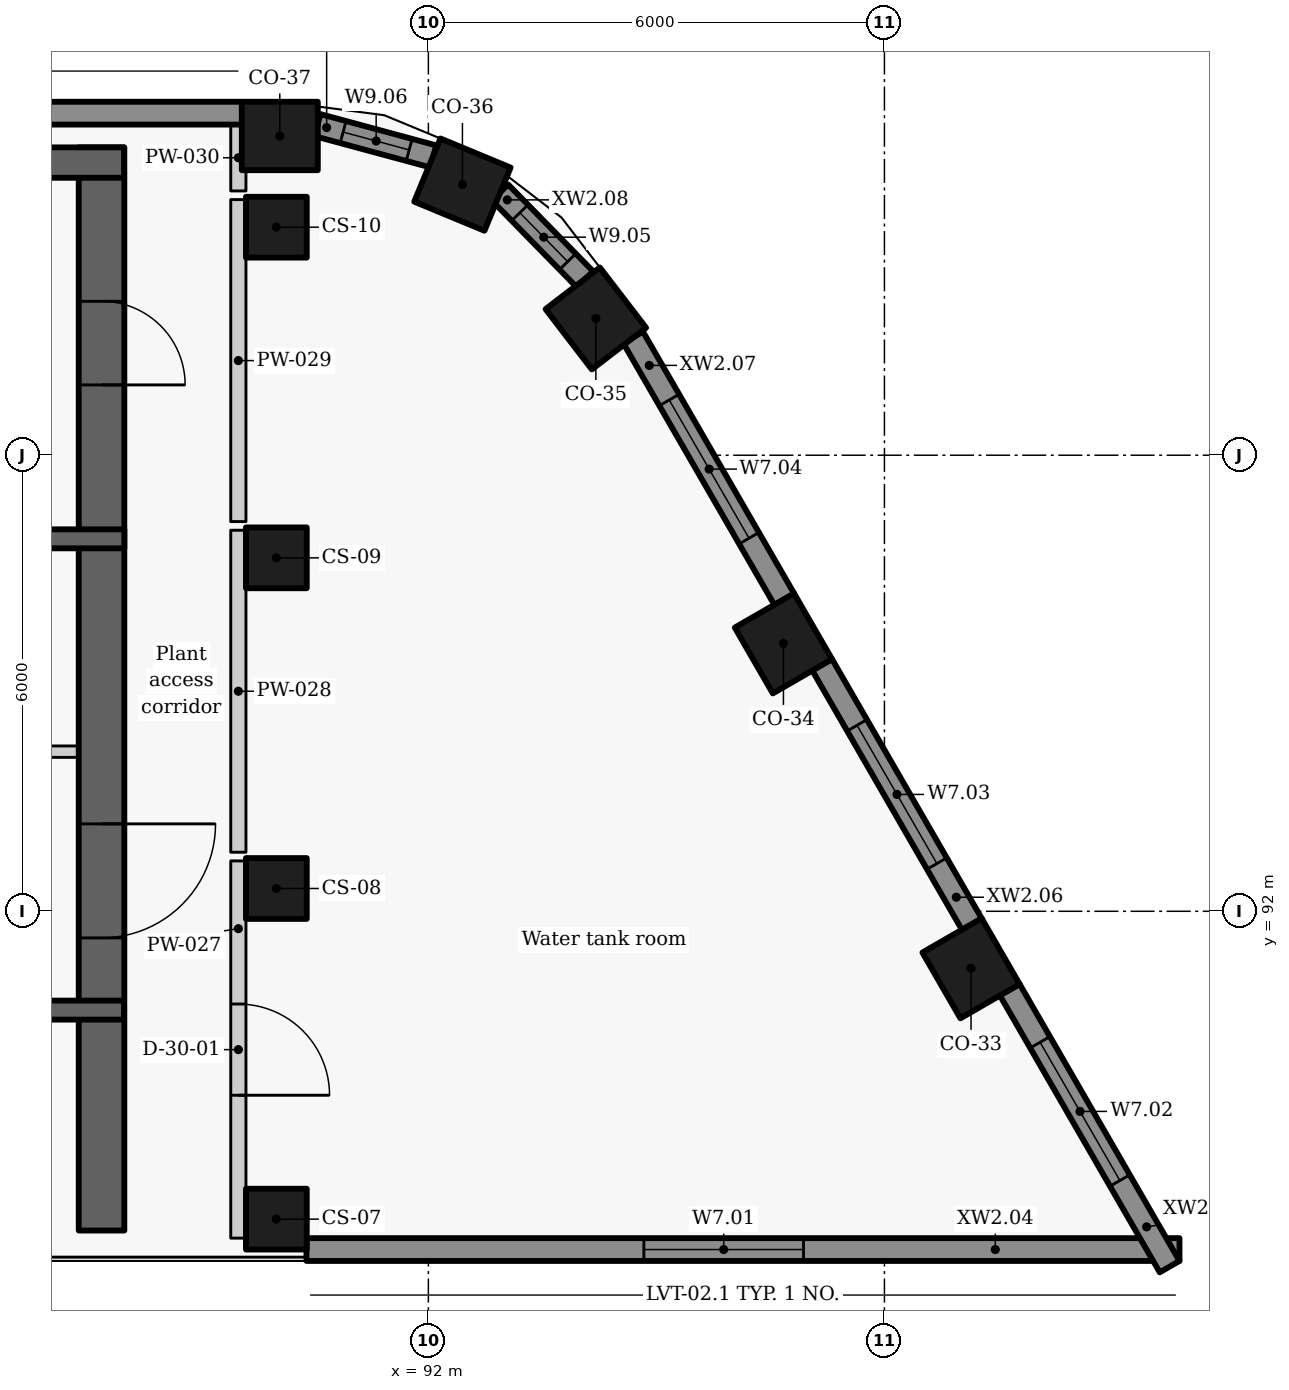
"""IFC4 building model, lengths in metres.
Left out: names, types, materials, properties, quantities, classifications, styles, units other than length and angle.
Written with IfcOpenShell. Run it as: python <this file> out.ifc"""

import sys

from ifc_helpers import new_model, si_unit, direction, frame, frame_2d, origin, origin_2d, place, context, subcontext, project, spatial, rectangle, extrude, element, fill, save


model = new_model("IFC4")
c1 = context("Model", 3, precision=1e-05, world=origin(), true_north=direction((0.0, 1.0)))
c2 = subcontext(c1, "Body", "Model", "MODEL_VIEW")
j1 = project(units=[si_unit("LENGTHUNIT", "METRE"), si_unit("PLANEANGLEUNIT", "RADIAN")], contexts=[c1])
p1 = place(None, origin())
s1 = spatial("IfcSite", under=j1, at=p1, CompositionType="ELEMENT")
p2 = place(p1, origin())
s2 = spatial("IfcBuilding", under=s1, at=p2, CompositionType="ELEMENT")
p3 = place(p2, frame((0.0, 0.0, 294.0)))
s3 = spatial("IfcBuildingStorey", under=s2, at=p3, CompositionType="ELEMENT", Elevation=294.0)
for number, where, z_axis, x_axis in (
    (1, (99.139, 91.25, 0.0), (0.0, 0.0, 1.0), (-0.5, 0.866, 0.0)),
    (2, (96.671, 95.525, 0.0), (0.0, 0.0, 1.0), (-0.5, 0.866, 0.0)),
    (3, (94.203, 99.8, 0.0), (0.0, 0.0, 1.0), (-0.609, 0.793, 0.0)),
    (4, (92.448, 101.56, 0.0), (0.0, 0.0, 1.0), (-0.924, 0.383, 0.0)),
    (5, (90.045, 102.2, 0.0), (0.0, 0.0, 1.0), (-1.0, 0.0, 0.0)),
):
    element("IfcColumn", number, at=place(p3, frame(where, z_axis=z_axis, x_axis=x_axis)), inside=s3, PredefinedType="COLUMN", context=c2, shape_type="SweptSolid", body=[
        extrude(rectangle(XDim=1.0, YDim=0.9, at=origin_2d()), origin(), (0.0, 0.0, 1.0), 3.6),
    ])
for number, where, z_axis, x_axis in (
    (6, (90.0, 87.95, 0.0), (0.0, 0.0, 1.0), (0.0, 1.0, 0.0)),
    (7, (90.0, 92.3, 0.0), (0.0, 0.0, 1.0), (0.0, 1.0, 0.0)),
    (8, (90.0, 96.65, 0.0), (0.0, 0.0, 1.0), (0.0, 1.0, 0.0)),
    (9, (90.0, 101.0, 0.0), (0.0, 0.0, 1.0), (0.0, 1.0, 0.0)),
):
    element("IfcColumn", number, at=place(p3, frame(where, z_axis=z_axis, x_axis=x_axis)), inside=s3, PredefinedType="COLUMN", context=c2, shape_type="SweptSolid", body=[
        extrude(rectangle(XDim=0.8, YDim=0.8, at=origin_2d()), origin(), (0.0, 0.0, 1.0), 3.6),
    ])
p4 = place(p3, frame((90.396, 87.55, 0.0), z_axis=(0.0, 0.0, 1.0), x_axis=(1.0, 0.0, 0.0)))
e10 = element("IfcWall", 10, at=p4, inside=s3, PredefinedType="SOLIDWALL", context=c2, shape_type="SweptSolid", body=[
    extrude(rectangle(XDim=11.486, YDim=0.3, at=frame_2d((5.743, 0.0))), origin(), (0.0, 0.0, 1.0), 3.325),
])
p5 = place(p4, frame((4.439, 0.0, 0.9)))
e11 = element("IfcOpeningElement", 11, at=p5, cuts=e10, PredefinedType="OPENING", context=c2, shape_type="SweptSolid", body=[
    extrude(rectangle(XDim=2.1, YDim=1.1, at=frame_2d((1.05, 0.55))), frame((0.0, 0.16, 0.0), z_axis=(0.0, -1.0, 0.0), x_axis=(1.0, 0.0, 0.0)), (0.0, 0.0, 1.0), 0.32),
])
p6 = place(p3, frame((101.752, 87.325, 0.0), z_axis=(0.0, 0.0, 1.0), x_axis=(-0.499981865284, 0.866035873614, 0.0)))
e12 = element("IfcWall", 12, at=p6, inside=s3, PredefinedType="SOLIDWALL", context=c2, shape_type="SweptSolid", body=[
    extrude(rectangle(XDim=4.209, YDim=0.3, at=frame_2d((2.104, 0.0))), origin(), (0.0, 0.0, 1.0), 3.325),
])
p7 = place(p6, frame((1.308, 0.0, 0.9)))
e13 = element("IfcOpeningElement", 13, at=p7, cuts=e12, PredefinedType="OPENING", context=c2, shape_type="SweptSolid", body=[
    extrude(rectangle(XDim=2.1, YDim=1.1, at=frame_2d((1.05, 0.55))), frame((0.0, 0.16, 0.0), z_axis=(0.0, -1.0, 0.0), x_axis=(1.0, 0.0, 0.0)), (0.0, 0.0, 1.0), 0.32),
])
p8 = place(p3, frame((99.151, 91.829, 0.0), z_axis=(0.0, 0.0, 1.0), x_axis=(-0.499986771468, 0.866033041146, 0.0)))
e14 = element("IfcWall", 14, at=p8, inside=s3, PredefinedType="SOLIDWALL", context=c2, shape_type="SweptSolid", body=[
    extrude(rectangle(XDim=3.944, YDim=0.3, at=frame_2d((1.972, 0.0))), origin(), (0.0, 0.0, 1.0), 3.325),
])
p9 = place(p8, frame((0.922, 0.0, 0.9)))
e15 = element("IfcOpeningElement", 15, at=p9, cuts=e14, PredefinedType="OPENING", context=c2, shape_type="SweptSolid", body=[
    extrude(rectangle(XDim=2.1, YDim=1.1, at=frame_2d((1.05, 0.55))), frame((0.0, 0.16, 0.0), z_axis=(0.0, -1.0, 0.0), x_axis=(1.0, 0.0, 0.0)), (0.0, 0.0, 1.0), 0.32),
])
p10 = place(p3, frame((96.683, 96.104, 0.0), z_axis=(0.0, 0.0, 1.0), x_axis=(-0.500005687176, 0.866022120267, 0.0)))
e16 = element("IfcWall", 16, at=p10, inside=s3, PredefinedType="SOLIDWALL", context=c2, shape_type="SweptSolid", body=[
    extrude(rectangle(XDim=3.979, YDim=0.3, at=frame_2d((1.99, 0.0))), origin(), (0.0, 0.0, 1.0), 3.325),
])
p11 = place(p10, frame((0.928, 0.0, 0.9)))
e17 = element("IfcOpeningElement", 17, at=p11, cuts=e16, PredefinedType="OPENING", context=c2, shape_type="SweptSolid", body=[
    extrude(rectangle(XDim=2.1, YDim=1.1, at=frame_2d((1.05, 0.55))), frame((0.0, 0.16, 0.0), z_axis=(0.0, -1.0, 0.0), x_axis=(1.0, 0.0, 0.0)), (0.0, 0.0, 1.0), 0.32),
])
p12 = place(p3, frame((94.06, 100.315, 0.0), z_axis=(0.0, 0.0, 1.0), x_axis=(-0.6992720923, 0.714855608449, 0.0)))
e18 = element("IfcWall", 18, at=p12, inside=s3, PredefinedType="SOLIDWALL", context=c2, shape_type="SweptSolid", body=[
    extrude(rectangle(XDim=1.598, YDim=0.3, at=frame_2d((0.799, 0.0))), origin(), (0.0, 0.0, 1.0), 3.325),
])
p13 = place(p12, frame((0.325, 0.0, 0.9)))
e19 = element("IfcOpeningElement", 19, at=p13, cuts=e18, PredefinedType="OPENING", context=c2, shape_type="SweptSolid", body=[
    extrude(rectangle(XDim=0.9, YDim=1.1, at=frame_2d((0.45, 0.55))), frame((0.0, 0.16, 0.0), z_axis=(0.0, -1.0, 0.0), x_axis=(1.0, 0.0, 0.0)), (0.0, 0.0, 1.0), 0.32),
])
p14 = place(p3, frame((92.065, 101.931, 0.0), z_axis=(0.0, 0.0, 1.0), x_axis=(-0.965371819036, 0.260877846914, 0.0)))
e20 = element("IfcWall", 20, at=p14, inside=s3, PredefinedType="SOLIDWALL", context=c2, shape_type="SweptSolid", body=[
    extrude(rectangle(XDim=1.578, YDim=0.3, at=frame_2d((0.789, 0.0))), origin(), (0.0, 0.0, 1.0), 3.325),
])
p15 = place(p14, frame((0.329, 0.0, 0.9)))
e21 = element("IfcOpeningElement", 21, at=p15, cuts=e20, PredefinedType="OPENING", context=c2, shape_type="SweptSolid", body=[
    extrude(rectangle(XDim=0.9, YDim=1.1, at=frame_2d((0.45, 0.55))), frame((0.0, 0.16, 0.0), z_axis=(0.0, -1.0, 0.0), x_axis=(1.0, 0.0, 0.0)), (0.0, 0.0, 1.0), 0.32),
])
p16 = place(p3, frame((89.549, 102.5, 0.0), z_axis=(0.0, 0.0, 1.0), x_axis=(-1.0, 0.0, 0.0)))
e22 = element("IfcWall", 22, at=p16, inside=s3, PredefinedType="SOLIDWALL", context=c2, shape_type="SweptSolid", body=[
    extrude(rectangle(XDim=19.134, YDim=0.3, at=frame_2d((9.567, 0.0))), origin(), (0.0, 0.0, 1.0), 3.325),
])
p17 = place(p3, frame((85.397, 94.1, 0.0), z_axis=(0.0, 0.0, 1.0), x_axis=(1.0, 0.0, 0.0)))
e23 = element("IfcWall", 23, at=p17, inside=s3, PredefinedType="PARTITIONING", context=c2, shape_type="SweptSolid", body=[
    extrude(rectangle(XDim=2.603, YDim=0.15, at=frame_2d((1.302, 0.0))), origin(), (0.0, 0.0, 1.0), 3.325),
])
p18 = place(p17, frame((0.528, 0.0, 0.0)))
e24 = element("IfcOpeningElement", 24, at=p18, cuts=e23, PredefinedType="OPENING", context=c2, shape_type="SweptSolid", body=[
    extrude(rectangle(XDim=0.9, YDim=2.1, at=frame_2d((0.45, 1.05))), frame((0.0, 0.085, 0.0), z_axis=(0.0, -1.0, 0.0), x_axis=(1.0, 0.0, 0.0)), (0.0, 0.0, 1.0), 0.17),
])
p19 = place(p3, frame((87.7, 102.05, -0.275), z_axis=(0.0, 0.0, 1.0), x_axis=(0.0, -1.0, 0.0)))
e25 = element("IfcWall", 25, at=p19, inside=s3, PredefinedType="SHEAR", context=c2, shape_type="SweptSolid", body=[
    extrude(rectangle(XDim=11.35, YDim=0.6, at=frame_2d((5.675, 0.0))), origin(), (0.0, 0.0, 1.0), 3.6),
])
p20 = place(p19, frame((8.9, 0.0, 0.275)))
e26 = element("IfcOpeningElement", 26, at=p20, cuts=e25, PredefinedType="OPENING", context=c2, shape_type="SweptSolid", body=[
    extrude(rectangle(XDim=1.5, YDim=2.1, at=frame_2d((0.75, 1.05))), frame((0.0, 0.31, 0.0), z_axis=(0.0, -1.0, 0.0), x_axis=(1.0, 0.0, 0.0)), (0.0, 0.0, 1.0), 0.62),
])
p21 = place(p19, frame((2.025, 0.0, 0.275)))
e27 = element("IfcOpeningElement", 27, at=p21, cuts=e25, PredefinedType="OPENING", context=c2, shape_type="SweptSolid", body=[
    extrude(rectangle(XDim=1.1, YDim=2.1, at=frame_2d((0.55, 1.05))), frame((0.0, 0.31, 0.0), z_axis=(0.0, -1.0, 0.0), x_axis=(1.0, 0.0, 0.0)), (0.0, 0.0, 1.0), 0.62),
])
p22 = place(p3, frame((80.547, 96.9, -0.275), z_axis=(0.0, 0.0, 1.0), x_axis=(1.0, 0.0, 0.0)))
e28 = element("IfcWall", 28, at=p22, inside=s3, PredefinedType="SHEAR", context=c2, shape_type="SweptSolid", body=[
    extrude(rectangle(XDim=7.453, YDim=0.25, at=frame_2d((3.727, 0.0))), origin(), (0.0, 0.0, 1.0), 3.6),
])
p23 = place(p22, frame((3.302, 0.0, 0.275)))
e29 = element("IfcOpeningElement", 29, at=p23, cuts=e28, PredefinedType="OPENING", context=c2, shape_type="SweptSolid", body=[
    extrude(rectangle(XDim=1.1, YDim=2.1, at=frame_2d((0.55, 1.05))), frame((0.0, 0.135, 0.0), z_axis=(0.0, -1.0, 0.0), x_axis=(1.0, 0.0, 0.0)), (0.0, 0.0, 1.0), 0.27),
])
p24 = place(p3, frame((89.5, 92.663, 0.0), z_axis=(0.0, 0.0, 1.0), x_axis=(0.0, -1.0, 0.0)))
e30 = element("IfcWall", 30, at=p24, inside=s3, PredefinedType="PARTITIONING", context=c2, shape_type="SweptSolid", body=[
    extrude(rectangle(XDim=4.963, YDim=0.2, at=frame_2d((2.481, 0.0))), origin(), (0.0, 0.0, 1.0), 3.325),
])
p25 = place(p24, frame((1.883, 0.0, 0.0)))
e31 = element("IfcOpeningElement", 31, at=p25, cuts=e30, PredefinedType="OPENING", context=c2, shape_type="SweptSolid", body=[
    extrude(rectangle(XDim=1.2, YDim=2.1, at=frame_2d((0.6, 1.05))), frame((0.0, 0.11, 0.0), z_axis=(0.0, -1.0, 0.0), x_axis=(1.0, 0.0, 0.0)), (0.0, 0.0, 1.0), 0.22),
])
p26 = place(p3, frame((89.5, 92.777, 0.0), z_axis=(0.0, 0.0, 1.0), x_axis=(0.0, 1.0, 0.0)))
e32 = element("IfcWall", 32, at=p26, inside=s3, PredefinedType="PARTITIONING", context=c2, shape_type="SweptSolid", body=[
    extrude(rectangle(XDim=4.236, YDim=0.2, at=frame_2d((2.118, 0.0))), origin(), (0.0, 0.0, 1.0), 3.325),
])
p27 = place(p3, frame((89.5, 97.127, 0.0), z_axis=(0.0, 0.0, 1.0), x_axis=(0.0, 1.0, 0.0)))
e33 = element("IfcWall", 33, at=p27, inside=s3, PredefinedType="PARTITIONING", context=c2, shape_type="SweptSolid", body=[
    extrude(rectangle(XDim=4.236, YDim=0.2, at=frame_2d((2.118, 0.0))), origin(), (0.0, 0.0, 1.0), 3.325),
])
p28 = place(p3, frame((89.5, 101.477, 0.0), z_axis=(0.0, 0.0, 1.0), x_axis=(0.0, 1.0, 0.0)))
e34 = element("IfcWall", 34, at=p28, inside=s3, PredefinedType="PARTITIONING", context=c2, shape_type="SweptSolid", body=[
    extrude(rectangle(XDim=0.873, YDim=0.2, at=frame_2d((0.437, 0.0))), origin(), (0.0, 0.0, 1.0), 3.325),
])
p29 = place(p3, frame((87.7, 87.8, -0.275), z_axis=(0.0, 0.0, 1.0), x_axis=(0.0, 1.0, 0.0)))
e35 = element("IfcWall", 35, at=p29, inside=s3, PredefinedType="SHEAR", context=c2, shape_type="SweptSolid", body=[
    extrude(rectangle(XDim=2.896, YDim=0.6, at=frame_2d((1.448, 0.0))), origin(), (0.0, 0.0, 1.0), 3.6),
])
p30 = place(p3, frame((85.404, 90.7, -0.275), z_axis=(0.0, 0.0, 1.0), x_axis=(1.0, 0.0, 0.0)))
e36 = element("IfcWall", 36, at=p30, inside=s3, PredefinedType="SHEAR", context=c2, shape_type="SweptSolid", body=[
    extrude(rectangle(XDim=2.592, YDim=0.25, at=frame_2d((1.296, 0.0))), origin(), (0.0, 0.0, 1.0), 3.6),
])
p31 = place(p3, frame((72.004, 101.85, -0.275), z_axis=(0.0, 0.0, 1.0), x_axis=(1.0, 0.0, 0.0)))
e37 = element("IfcWall", 37, at=p31, inside=s3, PredefinedType="SHEAR", context=c2, shape_type="SweptSolid", body=[
    extrude(rectangle(XDim=15.992, YDim=0.4, at=frame_2d((7.996, 0.0))), origin(), (0.0, 0.0, 1.0), 3.6),
])
p32 = place(p5, origin())
e38 = element("IfcWindow", 38, at=p32, inside=s3, PartitioningType="SINGLE_PANEL", PredefinedType="WINDOW", context=c2, shape_type="SweptSolid", body=[
    extrude(rectangle(XDim=2.1, YDim=1.1, at=frame_2d((1.05, 0.55))), frame((0.0, 0.03, 0.0), z_axis=(0.0, -1.0, 0.0), x_axis=(1.0, 0.0, 0.0)), (0.0, 0.0, 1.0), 0.06),
])
fill(e11, e38)
p33 = place(p7, origin())
e39 = element("IfcWindow", 39, at=p33, inside=s3, PartitioningType="SINGLE_PANEL", PredefinedType="WINDOW", context=c2, shape_type="SweptSolid", body=[
    extrude(rectangle(XDim=2.1, YDim=1.1, at=frame_2d((1.05, 0.55))), frame((0.0, 0.03, 0.0), z_axis=(0.0, -1.0, 0.0), x_axis=(1.0, 0.0, 0.0)), (0.0, 0.0, 1.0), 0.06),
])
fill(e13, e39)
p34 = place(p9, origin())
e40 = element("IfcWindow", 40, at=p34, inside=s3, PartitioningType="SINGLE_PANEL", PredefinedType="WINDOW", context=c2, shape_type="SweptSolid", body=[
    extrude(rectangle(XDim=2.1, YDim=1.1, at=frame_2d((1.05, 0.55))), frame((0.0, 0.03, 0.0), z_axis=(0.0, -1.0, 0.0), x_axis=(1.0, 0.0, 0.0)), (0.0, 0.0, 1.0), 0.06),
])
fill(e15, e40)
p35 = place(p11, origin())
e41 = element("IfcWindow", 41, at=p35, inside=s3, PartitioningType="SINGLE_PANEL", PredefinedType="WINDOW", context=c2, shape_type="SweptSolid", body=[
    extrude(rectangle(XDim=2.1, YDim=1.1, at=frame_2d((1.05, 0.55))), frame((0.0, 0.03, 0.0), z_axis=(0.0, -1.0, 0.0), x_axis=(1.0, 0.0, 0.0)), (0.0, 0.0, 1.0), 0.06),
])
fill(e17, e41)
p36 = place(p13, origin())
e42 = element("IfcWindow", 42, at=p36, inside=s3, PartitioningType="SINGLE_PANEL", PredefinedType="WINDOW", context=c2, shape_type="SweptSolid", body=[
    extrude(rectangle(XDim=0.9, YDim=1.1, at=frame_2d((0.45, 0.55))), frame((0.0, 0.03, 0.0), z_axis=(0.0, -1.0, 0.0), x_axis=(1.0, 0.0, 0.0)), (0.0, 0.0, 1.0), 0.06),
])
fill(e19, e42)
p37 = place(p15, origin())
e43 = element("IfcWindow", 43, at=p37, inside=s3, PartitioningType="SINGLE_PANEL", PredefinedType="WINDOW", context=c2, shape_type="SweptSolid", body=[
    extrude(rectangle(XDim=0.9, YDim=1.1, at=frame_2d((0.45, 0.55))), frame((0.0, 0.03, 0.0), z_axis=(0.0, -1.0, 0.0), x_axis=(1.0, 0.0, 0.0)), (0.0, 0.0, 1.0), 0.06),
])
fill(e21, e43)
p38 = place(p25, origin())
e44 = element("IfcDoor", 44, at=p38, inside=s3, OperationType="SINGLE_SWING_RIGHT", PredefinedType="DOOR", context=c2, shape_type="SweptSolid", body=[
    extrude(rectangle(XDim=1.2, YDim=2.1, at=frame_2d((0.6, 1.05))), frame((0.0, 0.025, 0.0), z_axis=(0.0, -1.0, 0.0), x_axis=(1.0, 0.0, 0.0)), (0.0, 0.0, 1.0), 0.05),
])
fill(e31, e44)
p39 = place(p20, origin())
e45 = element("IfcDoor", 45, at=p39, inside=s3, OperationType="DOUBLE_DOOR_SINGLE_SWING", PredefinedType="DOOR", context=c2, shape_type="SweptSolid", body=[
    extrude(rectangle(XDim=1.5, YDim=2.1, at=frame_2d((0.75, 1.05))), frame((0.0, 0.025, 0.0), z_axis=(0.0, -1.0, 0.0), x_axis=(1.0, 0.0, 0.0)), (0.0, 0.0, 1.0), 0.05),
])
fill(e26, e45)
p40 = place(p21, origin())
e46 = element("IfcDoor", 46, at=p40, inside=s3, OperationType="SINGLE_SWING_RIGHT", PredefinedType="DOOR", context=c2, shape_type="SweptSolid", body=[
    extrude(rectangle(XDim=1.1, YDim=2.1, at=frame_2d((0.55, 1.05))), frame((0.0, 0.025, 0.0), z_axis=(0.0, -1.0, 0.0), x_axis=(1.0, 0.0, 0.0)), (0.0, 0.0, 1.0), 0.05),
])
fill(e27, e46)
save(model, sys.argv[1])
